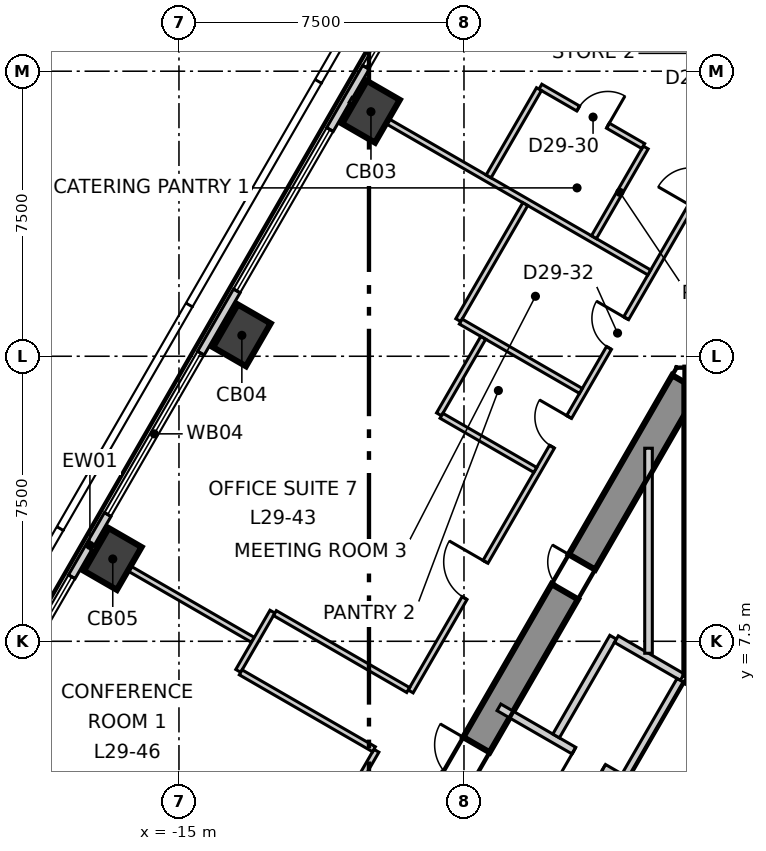
"""IFC4 building model, lengths in metres.
Left out: names, types, materials, properties, quantities, classifications, styles, units other than length and angle.
Written with IfcOpenShell. Run it as: python <this file> out.ifc"""

import sys

from ifc_helpers import new_model, si_unit, direction, frame, frame_2d, origin, origin_2d, place, context, subcontext, project, spatial, polyline, rectangle, outline, extrude, element, fill, save


model = new_model("IFC4")
c1 = context("Model", 3, precision=1e-05, world=origin(), true_north=direction((0.0, 1.0)))
c2 = subcontext(c1, "Body", "Model", "MODEL_VIEW")
j1 = project(units=[si_unit("LENGTHUNIT", "METRE"), si_unit("PLANEANGLEUNIT", "RADIAN")], contexts=[c1])
p1 = place(None, origin())
s1 = spatial("IfcSite", under=j1, at=p1, CompositionType="ELEMENT")
p2 = place(p1, origin())
s2 = spatial("IfcBuilding", under=s1, at=p2, CompositionType="ELEMENT")
p3 = place(p2, frame((0.0, 0.0, 128.3)))
s3 = spatial("IfcBuildingStorey", under=s2, at=p3, CompositionType="ELEMENT", Elevation=128.3)
p4 = place(p3, frame((1.674, 14.3, -0.3), z_axis=(0.0, 0.0, 1.0), x_axis=(-1.0, 0.0, 0.0)))
e1 = element("IfcWall", 1, at=p4, inside=s3, PredefinedType="SHEAR", context=c2, shape_type="SweptSolid", body=[
    extrude(outline(polyline([(-0.231, -0.4), (1.674, -0.4), (3.579, -0.4), (3.117, 0.4), (1.674, 0.4), (0.231, 0.4), (-0.231, -0.4)])), origin(), (0.0, 0.0, 1.0), 4.0),
])
p5 = place(p4, frame((0.974, 0.0, 0.3)))
e2 = element("IfcOpeningElement", 2, at=p5, cuts=e1, PredefinedType="OPENING", context=c2, shape_type="SweptSolid", body=[
    extrude(rectangle(XDim=1.4, YDim=2.1, at=frame_2d((0.7, 1.05))), frame((0.0, 0.41, 0.0), z_axis=(0.0, -1.0, 0.0), x_axis=(1.0, 0.0, 0.0)), (0.0, 0.0, 1.0), 0.82),
])
p6 = place(p3, frame((-1.674, 14.3, -0.3), z_axis=(0.0, 0.0, 1.0), x_axis=(-0.499995765644, -0.866027848477, 0.0)))
e3 = element("IfcWall", 3, at=p6, inside=s3, PredefinedType="SHEAR", context=c2, shape_type="SweptSolid", body=[
    extrude(outline(polyline([(-0.231, -0.4), (1.732, -0.4), (3.695, -0.4), (5.658, -0.4), (7.621, -0.4), (9.584, -0.4), (11.547, -0.4), (13.51, -0.4), (15.473, -0.4), (17.436, -0.4), (19.399, -0.4), (21.362, -0.4), (23.325, -0.4), (22.863, 0.4), (20.977, 0.4), (19.091, 0.4), (17.205, 0.4), (15.319, 0.4), (13.433, 0.4), (11.547, 0.4), (9.661, 0.4), (7.775, 0.4), (5.889, 0.4), (4.003, 0.4), (2.117, 0.4), (0.231, 0.4), (-0.231, -0.4)])), origin(), (0.0, 0.0, 1.0), 4.0),
])
p7 = place(p6, frame((10.997, 0.0, 0.3)))
e4 = element("IfcOpeningElement", 4, at=p7, cuts=e3, PredefinedType="OPENING", context=c2, shape_type="SweptSolid", body=[
    extrude(rectangle(XDim=1.1, YDim=2.1, at=frame_2d((0.55, 1.05))), frame((0.0, 0.41, 0.0), z_axis=(0.0, -1.0, 0.0), x_axis=(1.0, 0.0, 0.0)), (0.0, 0.0, 1.0), 0.82),
])
p8 = place(p6, frame((5.444, 0.0, 0.3)))
e5 = element("IfcOpeningElement", 5, at=p8, cuts=e3, PredefinedType="OPENING", context=c2, shape_type="SweptSolid", body=[
    extrude(rectangle(XDim=0.9, YDim=2.1, at=frame_2d((0.45, 1.05))), frame((0.0, 0.41, 0.0), z_axis=(0.0, -1.0, 0.0), x_axis=(1.0, 0.0, 0.0)), (0.0, 0.0, 1.0), 0.82),
])
for number, where, z_axis, x_axis in (
    (6, (-9.948, 21.434, -0.3), (0.0, 0.0, 1.0), (0.5, 0.866, 0.0)),
    (7, (-13.345, 15.55, -0.3), (0.0, 0.0, 1.0), (0.5, 0.866, 0.0)),
    (8, (-16.742, 9.666, -0.3), (0.0, 0.0, 1.0), (0.5, 0.866, 0.0)),
):
    element("IfcColumn", number, at=place(p3, frame(where, z_axis=z_axis, x_axis=x_axis)), inside=s3, PredefinedType="COLUMN", context=c2, shape_type="SweptSolid", body=[
        extrude(rectangle(XDim=1.3, YDim=1.0, at=origin_2d()), origin(), (0.0, 0.0, 1.0), 4.0),
    ])
p9 = place(p3, frame((-3.109, 34.679, 0.0), z_axis=(0.0, 0.0, 1.0), x_axis=(-0.50000689325, -0.866021423928, 0.0)))
e9 = element("IfcWall", 9, at=p9, inside=s3, PredefinedType="ELEMENTEDWALL", context=c2, shape_type="SweptSolid", body=[
    extrude(rectangle(XDim=56.937, YDim=0.2, at=frame_2d((28.469, 0.0))), origin(), (0.0, 0.0, 1.0), 3.7),
])
p10 = place(p9, frame((2.249, 0.0, 0.9)))
e10 = element("IfcOpeningElement", 10, at=p10, cuts=e9, PredefinedType="OPENING", context=c2, shape_type="SweptSolid", body=[
    extrude(rectangle(XDim=4.9, YDim=2.5, at=frame_2d((2.45, 1.25))), frame((0.0, 0.11, 0.0), z_axis=(0.0, -1.0, 0.0), x_axis=(1.0, 0.0, 0.0)), (0.0, 0.0, 1.0), 0.22),
])
p11 = place(p9, frame((9.043, 0.0, 0.9)))
e11 = element("IfcOpeningElement", 11, at=p11, cuts=e9, PredefinedType="OPENING", context=c2, shape_type="SweptSolid", body=[
    extrude(rectangle(XDim=4.9, YDim=2.5, at=frame_2d((2.45, 1.25))), frame((0.0, 0.11, 0.0), z_axis=(0.0, -1.0, 0.0), x_axis=(1.0, 0.0, 0.0)), (0.0, 0.0, 1.0), 0.22),
])
p12 = place(p9, frame((15.837, 0.0, 0.9)))
e12 = element("IfcOpeningElement", 12, at=p12, cuts=e9, PredefinedType="OPENING", context=c2, shape_type="SweptSolid", body=[
    extrude(rectangle(XDim=4.9, YDim=2.5, at=frame_2d((2.45, 1.25))), frame((0.0, 0.11, 0.0), z_axis=(0.0, -1.0, 0.0), x_axis=(1.0, 0.0, 0.0)), (0.0, 0.0, 1.0), 0.22),
])
p13 = place(p9, frame((22.631, 0.0, 0.9)))
e13 = element("IfcOpeningElement", 13, at=p13, cuts=e9, PredefinedType="OPENING", context=c2, shape_type="SweptSolid", body=[
    extrude(rectangle(XDim=4.9, YDim=2.5, at=frame_2d((2.45, 1.25))), frame((0.0, 0.11, 0.0), z_axis=(0.0, -1.0, 0.0), x_axis=(1.0, 0.0, 0.0)), (0.0, 0.0, 1.0), 0.22),
])
p14 = place(p9, frame((29.425, 0.0, 0.9)))
e14 = element("IfcOpeningElement", 14, at=p14, cuts=e9, PredefinedType="OPENING", context=c2, shape_type="SweptSolid", body=[
    extrude(rectangle(XDim=4.9, YDim=2.5, at=frame_2d((2.45, 1.25))), frame((0.0, 0.11, 0.0), z_axis=(0.0, -1.0, 0.0), x_axis=(1.0, 0.0, 0.0)), (0.0, 0.0, 1.0), 0.22),
])
p15 = place(p9, frame((36.219, 0.0, 0.9)))
e15 = element("IfcOpeningElement", 15, at=p15, cuts=e9, PredefinedType="OPENING", context=c2, shape_type="SweptSolid", body=[
    extrude(rectangle(XDim=4.9, YDim=2.5, at=frame_2d((2.45, 1.25))), frame((0.0, 0.11, 0.0), z_axis=(0.0, -1.0, 0.0), x_axis=(1.0, 0.0, 0.0)), (0.0, 0.0, 1.0), 0.22),
])
p16 = place(p9, frame((43.013, 0.0, 0.9)))
e16 = element("IfcOpeningElement", 16, at=p16, cuts=e9, PredefinedType="OPENING", context=c2, shape_type="SweptSolid", body=[
    extrude(rectangle(XDim=4.9, YDim=2.5, at=frame_2d((2.45, 1.25))), frame((0.0, 0.11, 0.0), z_axis=(0.0, -1.0, 0.0), x_axis=(1.0, 0.0, 0.0)), (0.0, 0.0, 1.0), 0.22),
])
p17 = place(p9, frame((49.807, 0.0, 0.9)))
e17 = element("IfcOpeningElement", 17, at=p17, cuts=e9, PredefinedType="OPENING", context=c2, shape_type="SweptSolid", body=[
    extrude(rectangle(XDim=4.9, YDim=2.5, at=frame_2d((2.45, 1.25))), frame((0.0, 0.11, 0.0), z_axis=(0.0, -1.0, 0.0), x_axis=(1.0, 0.0, 0.0)), (0.0, 0.0, 1.0), 0.22),
])
p18 = place(p3, frame((-20.676, 4.092, 0.0), z_axis=(0.0, 0.0, 1.0), x_axis=(0.866049876065, -0.49995761037, 0.0)))
e18 = element("IfcWall", 18, at=p18, inside=s3, PredefinedType="PARTITIONING", context=c2, shape_type="SweptSolid", body=[
    extrude(rectangle(XDim=9.077, YDim=0.15, at=frame_2d((4.539, 0.0))), origin(), (0.0, 0.0, 1.0), 3.7),
])
p19 = place(p3, frame((-18.631, -10.67, 0.0), z_axis=(0.0, 0.0, 1.0), x_axis=(0.499976222121, 0.866039131514, 0.0)))
e19 = element("IfcWall", 19, at=p19, inside=s3, PredefinedType="PARTITIONING", context=c2, shape_type="SweptSolid", body=[
    extrude(rectangle(XDim=17.655, YDim=0.15, at=frame_2d((8.828, 0.0))), origin(), (0.0, 0.0, 1.0), 3.7),
])
p20 = place(p19, frame((14.206, 0.0, 0.0)))
e20 = element("IfcOpeningElement", 20, at=p20, cuts=e19, PredefinedType="OPENING", context=c2, shape_type="SweptSolid", body=[
    extrude(rectangle(XDim=1.0, YDim=2.1, at=frame_2d((0.5, 1.05))), frame((0.0, 0.085, 0.0), z_axis=(0.0, -1.0, 0.0), x_axis=(1.0, 0.0, 0.0)), (0.0, 0.0, 1.0), 0.17),
])
p21 = place(p19, frame((7.912, 0.0, 0.0)))
e21 = element("IfcOpeningElement", 21, at=p21, cuts=e19, PredefinedType="OPENING", context=c2, shape_type="SweptSolid", body=[
    extrude(rectangle(XDim=1.0, YDim=2.1, at=frame_2d((0.5, 1.05))), frame((0.0, 0.085, 0.0), z_axis=(0.0, -1.0, 0.0), x_axis=(1.0, 0.0, 0.0)), (0.0, 0.0, 1.0), 0.17),
])
p22 = place(p19, frame((1.818, 0.0, 0.0)))
e22 = element("IfcOpeningElement", 22, at=p22, cuts=e19, PredefinedType="OPENING", context=c2, shape_type="SweptSolid", body=[
    extrude(rectangle(XDim=1.1, YDim=2.1, at=frame_2d((0.55, 1.05))), frame((0.0, 0.085, 0.0), z_axis=(0.0, -1.0, 0.0), x_axis=(1.0, 0.0, 0.0)), (0.0, 0.0, 1.0), 0.17),
])
p23 = place(p3, frame((-8.903, 6.18, 0.0), z_axis=(0.0, 0.0, 1.0), x_axis=(0.500010074151, 0.866019587393, 0.0)))
e23 = element("IfcWall", 23, at=p23, inside=s3, PredefinedType="PARTITIONING", context=c2, shape_type="SweptSolid", body=[
    extrude(rectangle(XDim=17.806, YDim=0.15, at=frame_2d((8.903, 0.0))), origin(), (0.0, 0.0, 1.0), 3.7),
])
p24 = place(p23, frame((14.756, 0.0, 0.0)))
e24 = element("IfcOpeningElement", 24, at=p24, cuts=e23, PredefinedType="OPENING", context=c2, shape_type="SweptSolid", body=[
    extrude(rectangle(XDim=1.0, YDim=2.1, at=frame_2d((0.5, 1.05))), frame((0.0, 0.085, 0.0), z_axis=(0.0, -1.0, 0.0), x_axis=(1.0, 0.0, 0.0)), (0.0, 0.0, 1.0), 0.17),
])
p25 = place(p23, frame((2.838, 0.0, 0.0)))
e25 = element("IfcOpeningElement", 25, at=p25, cuts=e23, PredefinedType="OPENING", context=c2, shape_type="SweptSolid", body=[
    extrude(rectangle(XDim=1.1, YDim=2.1, at=frame_2d((0.55, 1.05))), frame((0.0, 0.085, 0.0), z_axis=(0.0, -1.0, 0.0), x_axis=(1.0, 0.0, 0.0)), (0.0, 0.0, 1.0), 0.17),
])
p26 = place(p23, frame((10.438, 0.0, 0.0)))
e26 = element("IfcOpeningElement", 26, at=p26, cuts=e23, PredefinedType="OPENING", context=c2, shape_type="SweptSolid", body=[
    extrude(rectangle(XDim=0.9, YDim=2.1, at=frame_2d((0.45, 1.05))), frame((0.0, 0.085, 0.0), z_axis=(0.0, -1.0, 0.0), x_axis=(1.0, 0.0, 0.0)), (0.0, 0.0, 1.0), 0.17),
])
p27 = place(p23, frame((7.438, 0.0, 0.0)))
e27 = element("IfcOpeningElement", 27, at=p27, cuts=e23, PredefinedType="OPENING", context=c2, shape_type="SweptSolid", body=[
    extrude(rectangle(XDim=0.9, YDim=2.1, at=frame_2d((0.45, 1.05))), frame((0.0, 0.085, 0.0), z_axis=(0.0, -1.0, 0.0), x_axis=(1.0, 0.0, 0.0)), (0.0, 0.0, 1.0), 0.17),
])
p28 = place(p3, frame((-17.279, 9.976, 0.0), z_axis=(0.0, 0.0, 1.0), x_axis=(0.866097235509, -0.49987556316, 0.0)))
e28 = element("IfcWall", 28, at=p28, inside=s3, PredefinedType="PARTITIONING", context=c2, shape_type="SweptSolid", body=[
    extrude(rectangle(XDim=4.877, YDim=0.15, at=frame_2d((2.438, 0.0))), origin(), (0.0, 0.0, 1.0), 3.2),
])
p29 = place(p3, frame((-13.44, 6.721, 0.0), z_axis=(0.0, 0.0, 1.0), x_axis=(0.500137434689, 0.865946041288, 0.0)))
e29 = element("IfcWall", 29, at=p29, inside=s3, PredefinedType="PARTITIONING", context=c2, shape_type="SweptSolid", body=[
    extrude(rectangle(XDim=1.799, YDim=0.15, at=frame_2d((0.9, 0.0))), origin(), (0.0, 0.0, 1.0), 3.7),
])
p30 = place(p3, frame((-12.475, 8.242, 0.0), z_axis=(0.0, 0.0, 1.0), x_axis=(0.865955608197, -0.500120870022, 0.0)))
e30 = element("IfcWall", 30, at=p30, inside=s3, PredefinedType="PARTITIONING", context=c2, shape_type="SweptSolid", body=[
    extrude(rectangle(XDim=4.049, YDim=0.15, at=frame_2d((2.024, 0.0))), origin(), (0.0, 0.0, 1.0), 3.7),
])
p31 = place(p3, frame((-13.375, 6.683, 0.0), z_axis=(0.0, 0.0, 1.0), x_axis=(0.866033948129, -0.499985200469, 0.0)))
e31 = element("IfcWall", 31, at=p31, inside=s3, PredefinedType="PARTITIONING", context=c2, shape_type="SweptSolid", body=[
    extrude(rectangle(XDim=4.048, YDim=0.15, at=frame_2d((2.024, 0.0))), origin(), (0.0, 0.0, 1.0), 3.7),
])
p32 = place(p3, frame((-10.485, 21.744, 0.0), z_axis=(0.0, 0.0, 1.0), x_axis=(0.866014937375, -0.500018127915, 0.0)))
e32 = element("IfcWall", 32, at=p32, inside=s3, PredefinedType="PARTITIONING", context=c2, shape_type="SweptSolid", body=[
    extrude(rectangle(XDim=9.077, YDim=0.15, at=frame_2d((4.539, 0.0))), origin(), (0.0, 0.0, 1.0), 3.7),
])
p33 = place(p3, frame((-7.65, 15.95, 0.0), z_axis=(0.0, 0.0, 1.0), x_axis=(0.500064136673, 0.865988371292, 0.0)))
e33 = element("IfcWall", 33, at=p33, inside=s3, PredefinedType="PARTITIONING", context=c2, shape_type="SweptSolid", body=[
    extrude(rectangle(XDim=3.525, YDim=0.15, at=frame_2d((1.763, 0.0))), origin(), (0.0, 0.0, 1.0), 3.7),
])
p34 = place(p3, frame((-7.585, 15.913, 0.0), z_axis=(0.0, 0.0, 1.0), x_axis=(0.865995104784, -0.500052475737, 0.0)))
e34 = element("IfcWall", 34, at=p34, inside=s3, PredefinedType="PARTITIONING", context=c2, shape_type="SweptSolid", body=[
    extrude(rectangle(XDim=3.65, YDim=0.15, at=frame_2d((1.825, 0.0))), origin(), (0.0, 0.0, 1.0), 3.7),
])
p35 = place(p3, frame((-8.157, 13.472, 0.0), z_axis=(0.0, 0.0, 1.0), x_axis=(0.500249606323, 0.865881245537, 0.0)))
e35 = element("IfcWall", 35, at=p35, inside=s3, PredefinedType="PARTITIONING", context=c2, shape_type="SweptSolid", body=[
    extrude(rectangle(XDim=2.325, YDim=0.15, at=frame_2d((1.163, 0.0))), origin(), (0.0, 0.0, 1.0), 3.7),
])
p36 = place(p3, frame((-8.092, 13.434, 0.0), z_axis=(0.0, 0.0, 1.0), x_axis=(0.866004402611, -0.500036373335, 0.0)))
e36 = element("IfcWall", 36, at=p36, inside=s3, PredefinedType="PARTITIONING", context=c2, shape_type="SweptSolid", body=[
    extrude(rectangle(XDim=2.85, YDim=0.15, at=frame_2d((1.425, 0.0))), origin(), (0.0, 0.0, 1.0), 3.7),
])
p37 = place(p3, frame((-4.08, 18.133, 0.0), z_axis=(0.0, 0.0, 1.0), x_axis=(0.499887924105, 0.866090101164, 0.0)))
e37 = element("IfcWall", 37, at=p37, inside=s3, PredefinedType="PARTITIONING", context=c2, shape_type="SweptSolid", body=[
    extrude(rectangle(XDim=2.725, YDim=0.15, at=frame_2d((1.362, 0.0))), origin(), (0.0, 0.0, 1.0), 3.7),
])
p38 = place(p3, frame((-5.489, 22.093, 0.0), z_axis=(0.0, 0.0, 1.0), x_axis=(0.865935755868, -0.500155242608, 0.0)))
e38 = element("IfcWall", 38, at=p38, inside=s3, PredefinedType="PARTITIONING", context=c2, shape_type="SweptSolid", body=[
    extrude(rectangle(XDim=3.125, YDim=0.15, at=frame_2d((1.562, 0.0))), origin(), (0.0, 0.0, 1.0), 3.7),
])
p39 = place(p38, frame((1.15, 0.0, 0.0)))
e39 = element("IfcOpeningElement", 39, at=p39, cuts=e38, PredefinedType="OPENING", context=c2, shape_type="SweptSolid", body=[
    extrude(rectangle(XDim=0.9, YDim=2.1, at=frame_2d((0.45, 1.05))), frame((0.0, 0.085, 0.0), z_axis=(0.0, -1.0, 0.0), x_axis=(1.0, 0.0, 0.0)), (0.0, 0.0, 1.0), 0.17),
])
p40 = place(p3, frame((-6.852, 19.733, 0.0), z_axis=(0.0, 0.0, 1.0), x_axis=(0.499953715521, 0.866052124492, 0.0)))
e40 = element("IfcWall", 40, at=p40, inside=s3, PredefinedType="PARTITIONING", context=c2, shape_type="SweptSolid", body=[
    extrude(rectangle(XDim=2.65, YDim=0.15, at=frame_2d((1.325, 0.0))), origin(), (0.0, 0.0, 1.0), 3.7),
])
p41 = place(p3, frame((-6.58, 5.762, 0.0), z_axis=(0.0, 0.0, 1.0), x_axis=(0.866029704776, -0.49999255039, 0.0)))
e41 = element("IfcWall", 41, at=p41, inside=s3, PredefinedType="SOLIDWALL", context=c2, shape_type="SweptSolid", body=[
    extrude(rectangle(XDim=3.782, YDim=0.2, at=frame_2d((1.891, 0.0))), origin(), (0.0, 0.0, 1.0), 3.7),
])
p42 = place(p41, frame((2.279, 0.0, 0.0)))
e42 = element("IfcOpeningElement", 42, at=p42, cuts=e41, PredefinedType="OPENING", context=c2, shape_type="SweptSolid", body=[
    extrude(rectangle(XDim=0.9, YDim=2.1, at=frame_2d((0.45, 1.05))), frame((0.0, 0.11, 0.0), z_axis=(0.0, -1.0, 0.0), x_axis=(1.0, 0.0, 0.0)), (0.0, 0.0, 1.0), 0.22),
])
p43 = place(p3, frame((-5.076, 5.009, 0.0), z_axis=(0.0, 0.0, 1.0), x_axis=(0.50002537861, 0.866010750942, 0.0)))
e43 = element("IfcWall", 43, at=p43, inside=s3, PredefinedType="SOLIDWALL", context=c2, shape_type="SweptSolid", body=[
    extrude(rectangle(XDim=3.0, YDim=0.2, at=frame_2d((1.5, 0.0))), origin(), (0.0, 0.0, 1.0), 3.7),
])
p44 = place(p3, frame((-3.489, 7.557, 0.0), z_axis=(0.0, 0.0, 1.0), x_axis=(0.866010750942, -0.50002537861, 0.0)))
e44 = element("IfcWall", 44, at=p44, inside=s3, PredefinedType="SOLIDWALL", context=c2, shape_type="SweptSolid", body=[
    extrude(rectangle(XDim=2.0, YDim=0.2, at=frame_2d((1.0, 0.0))), origin(), (0.0, 0.0, 1.0), 3.7),
])
p45 = place(p3, frame((-3.257, 3.959, 0.0), z_axis=(0.0, 0.0, 1.0), x_axis=(0.50012328804, 0.865954211699, 0.0)))
e45 = element("IfcWall", 45, at=p45, inside=s3, PredefinedType="SOLIDWALL", context=c2, shape_type="SweptSolid", body=[
    extrude(rectangle(XDim=2.9, YDim=0.2, at=frame_2d((1.45, 0.0))), origin(), (0.0, 0.0, 1.0), 3.7),
])
p46 = place(p3, frame((-1.67, 6.507, 0.0), z_axis=(0.0, 0.0, 1.0), x_axis=(0.865941441609, -0.500145398563, 0.0)))
e46 = element("IfcWall", 46, at=p46, inside=s3, PredefinedType="SOLIDWALL", context=c2, shape_type="SweptSolid", body=[
    extrude(rectangle(XDim=1.815, YDim=0.2, at=frame_2d((0.908, 0.0))), origin(), (0.0, 0.0, 1.0), 3.7),
])
p47 = place(p3, frame((-2.644, 7.185, 0.0), z_axis=(0.0, 0.0, 1.0), x_axis=(0.0, 1.0, 0.0)))
e47 = element("IfcWall", 47, at=p47, inside=s3, PredefinedType="SOLIDWALL", context=c2, shape_type="SweptSolid", body=[
    extrude(rectangle(XDim=5.395, YDim=0.2, at=frame_2d((2.698, 0.0))), origin(), (0.0, 0.0, 1.0), 3.7),
])
p48 = place(p3, frame((-1.6, 6.615, 0.0), z_axis=(0.0, 0.0, 1.0), x_axis=(0.0, 1.0, 0.0)))
e48 = element("IfcWall", 48, at=p48, inside=s3, PredefinedType="SOLIDWALL", context=c2, shape_type="SweptSolid", body=[
    extrude(rectangle(XDim=7.665, YDim=0.2, at=frame_2d((3.833, 0.0))), origin(), (0.0, 0.0, 1.0), 3.7),
])
p49 = place(p11, origin())
e49 = element("IfcWindow", 49, at=p49, inside=s3, PartitioningType="SINGLE_PANEL", PredefinedType="WINDOW", context=c2, shape_type="SweptSolid", body=[
    extrude(rectangle(XDim=4.9, YDim=2.5, at=frame_2d((2.45, 1.25))), frame((0.0, 0.03, 0.0), z_axis=(0.0, -1.0, 0.0), x_axis=(1.0, 0.0, 0.0)), (0.0, 0.0, 1.0), 0.06),
])
fill(e11, e49)
p50 = place(p12, origin())
e50 = element("IfcWindow", 50, at=p50, inside=s3, PartitioningType="SINGLE_PANEL", PredefinedType="WINDOW", context=c2, shape_type="SweptSolid", body=[
    extrude(rectangle(XDim=4.9, YDim=2.5, at=frame_2d((2.45, 1.25))), frame((0.0, 0.03, 0.0), z_axis=(0.0, -1.0, 0.0), x_axis=(1.0, 0.0, 0.0)), (0.0, 0.0, 1.0), 0.06),
])
fill(e12, e50)
p51 = place(p13, origin())
e51 = element("IfcWindow", 51, at=p51, inside=s3, PartitioningType="SINGLE_PANEL", PredefinedType="WINDOW", context=c2, shape_type="SweptSolid", body=[
    extrude(rectangle(XDim=4.9, YDim=2.5, at=frame_2d((2.45, 1.25))), frame((0.0, 0.03, 0.0), z_axis=(0.0, -1.0, 0.0), x_axis=(1.0, 0.0, 0.0)), (0.0, 0.0, 1.0), 0.06),
])
fill(e13, e51)
p52 = place(p14, origin())
e52 = element("IfcWindow", 52, at=p52, inside=s3, PartitioningType="SINGLE_PANEL", PredefinedType="WINDOW", context=c2, shape_type="SweptSolid", body=[
    extrude(rectangle(XDim=4.9, YDim=2.5, at=frame_2d((2.45, 1.25))), frame((0.0, 0.03, 0.0), z_axis=(0.0, -1.0, 0.0), x_axis=(1.0, 0.0, 0.0)), (0.0, 0.0, 1.0), 0.06),
])
fill(e14, e52)
p53 = place(p42, origin())
e53 = element("IfcDoor", 53, at=p53, inside=s3, OperationType="SINGLE_SWING_LEFT", PredefinedType="DOOR", context=c2, shape_type="SweptSolid", body=[
    extrude(rectangle(XDim=0.9, YDim=2.1, at=frame_2d((0.45, 1.05))), frame((0.0, 0.025, 0.0), z_axis=(0.0, -1.0, 0.0), x_axis=(1.0, 0.0, 0.0)), (0.0, 0.0, 1.0), 0.05),
])
fill(e42, e53)
p54 = place(p39, origin())
e54 = element("IfcDoor", 54, at=p54, inside=s3, OperationType="SINGLE_SWING_LEFT", PredefinedType="DOOR", context=c2, shape_type="SweptSolid", body=[
    extrude(rectangle(XDim=0.9, YDim=2.1, at=frame_2d((0.45, 1.05))), frame((0.0, 0.025, 0.0), z_axis=(0.0, -1.0, 0.0), x_axis=(1.0, 0.0, 0.0)), (0.0, 0.0, 1.0), 0.05),
])
fill(e39, e54)
p55 = place(p25, origin())
e55 = element("IfcDoor", 55, at=p55, inside=s3, OperationType="SINGLE_SWING_LEFT", PredefinedType="DOOR", context=c2, shape_type="SweptSolid", body=[
    extrude(rectangle(XDim=1.1, YDim=2.1, at=frame_2d((0.55, 1.05))), frame((0.0, 0.025, 0.0), z_axis=(0.0, -1.0, 0.0), x_axis=(1.0, 0.0, 0.0)), (0.0, 0.0, 1.0), 0.05),
])
fill(e25, e55)
p56 = place(p26, origin())
e56 = element("IfcDoor", 56, at=p56, inside=s3, OperationType="SINGLE_SWING_LEFT", PredefinedType="DOOR", context=c2, shape_type="SweptSolid", body=[
    extrude(rectangle(XDim=0.9, YDim=2.1, at=frame_2d((0.45, 1.05))), frame((0.0, 0.025, 0.0), z_axis=(0.0, -1.0, 0.0), x_axis=(1.0, 0.0, 0.0)), (0.0, 0.0, 1.0), 0.05),
])
fill(e26, e56)
p57 = place(p27, origin())
e57 = element("IfcDoor", 57, at=p57, inside=s3, OperationType="SINGLE_SWING_LEFT", PredefinedType="DOOR", context=c2, shape_type="SweptSolid", body=[
    extrude(rectangle(XDim=0.9, YDim=2.1, at=frame_2d((0.45, 1.05))), frame((0.0, 0.025, 0.0), z_axis=(0.0, -1.0, 0.0), x_axis=(1.0, 0.0, 0.0)), (0.0, 0.0, 1.0), 0.05),
])
fill(e27, e57)
p58 = place(p7, origin())
e58 = element("IfcDoor", 58, at=p58, inside=s3, OperationType="SINGLE_SWING_LEFT", PredefinedType="DOOR", context=c2, shape_type="SweptSolid", body=[
    extrude(rectangle(XDim=1.1, YDim=2.1, at=frame_2d((0.55, 1.05))), frame((0.0, 0.025, 0.0), z_axis=(0.0, -1.0, 0.0), x_axis=(1.0, 0.0, 0.0)), (0.0, 0.0, 1.0), 0.05),
])
fill(e4, e58)
p59 = place(p8, origin())
e59 = element("IfcDoor", 59, at=p59, inside=s3, OperationType="SINGLE_SWING_LEFT", PredefinedType="DOOR", context=c2, shape_type="SweptSolid", body=[
    extrude(rectangle(XDim=0.9, YDim=2.1, at=frame_2d((0.45, 1.05))), frame((0.0, 0.025, 0.0), z_axis=(0.0, -1.0, 0.0), x_axis=(1.0, 0.0, 0.0)), (0.0, 0.0, 1.0), 0.05),
])
fill(e5, e59)
save(model, sys.argv[1])
